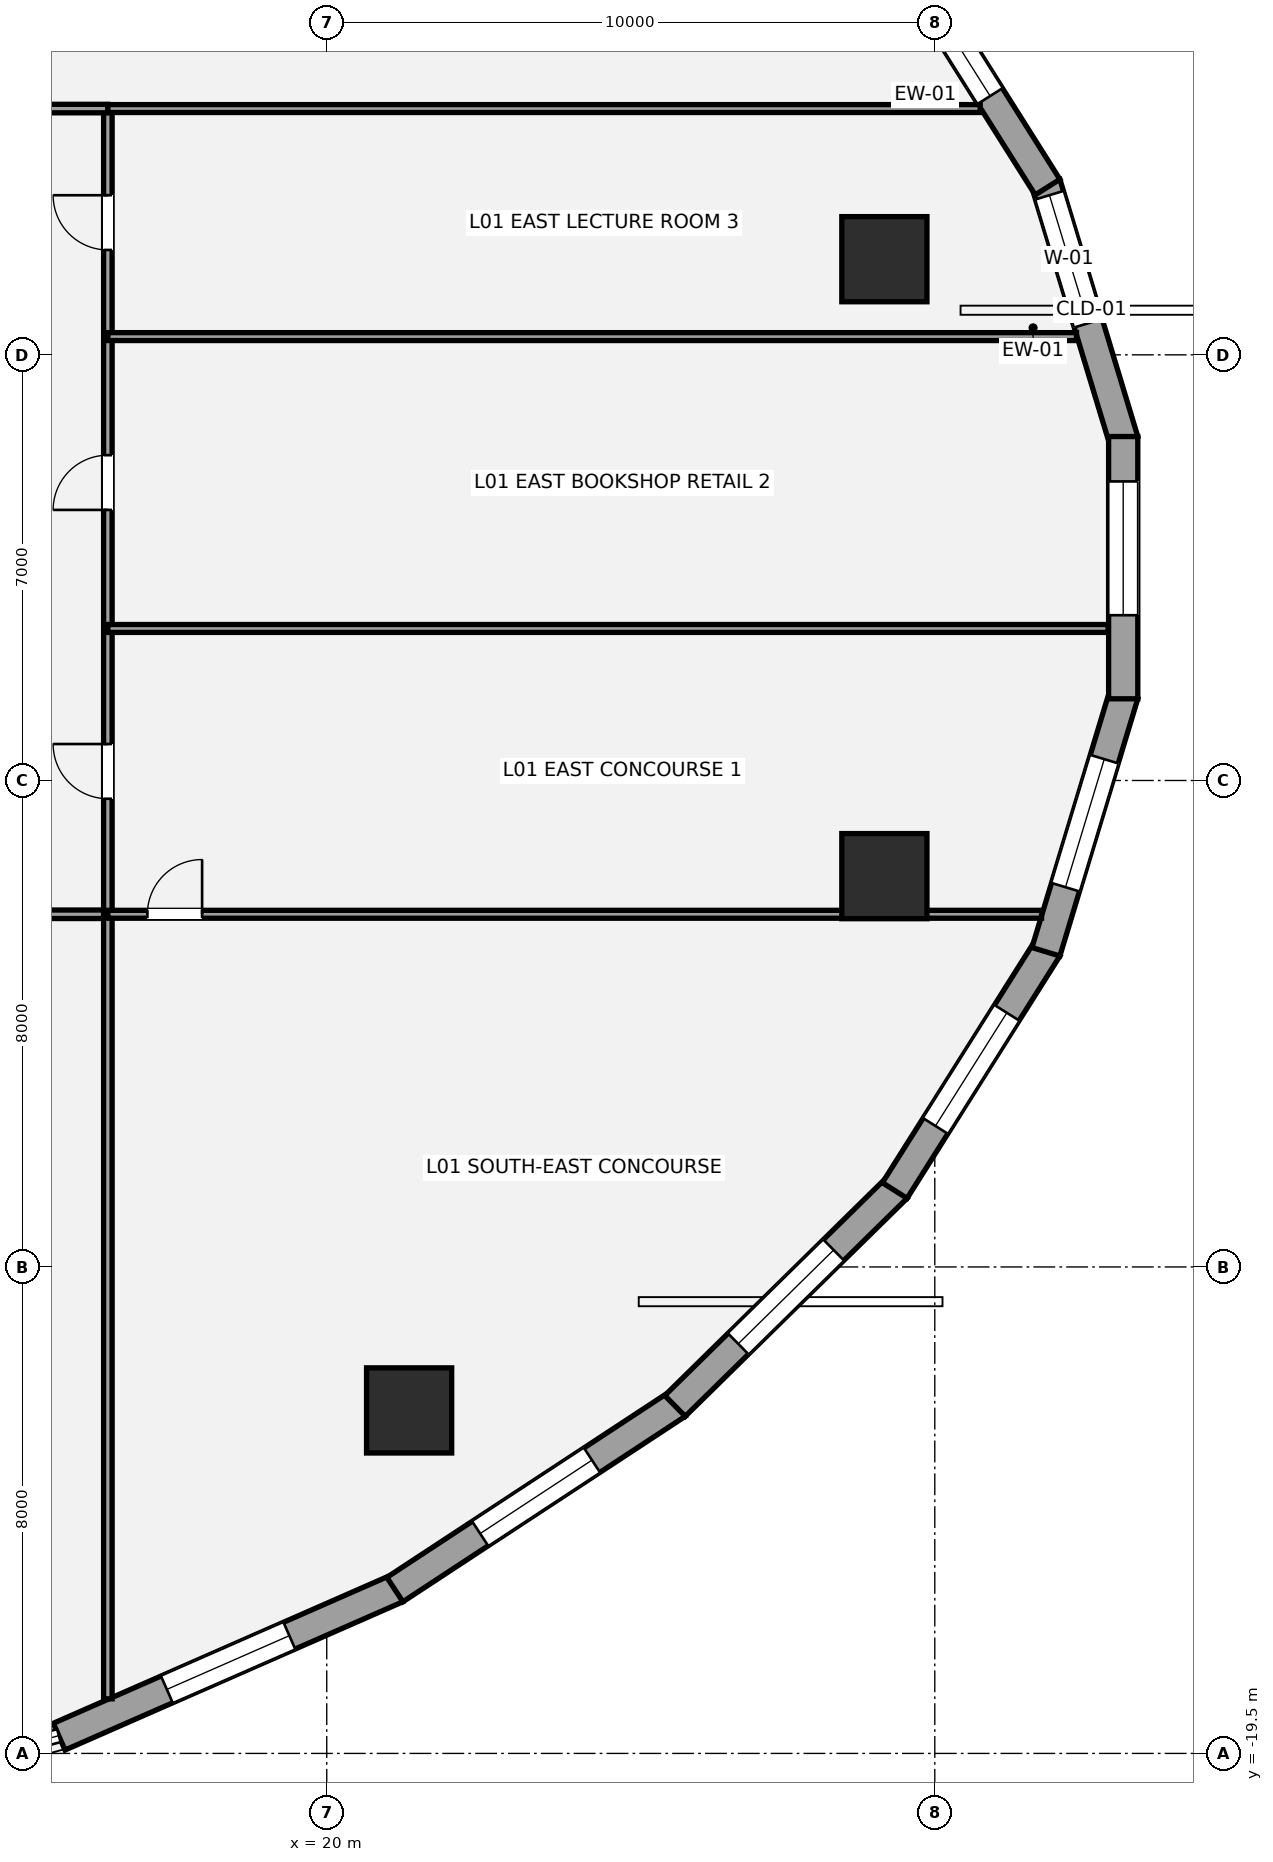
"""IFC4 building model, lengths in metres.
Left out: names, types, materials, properties, quantities, classifications, styles, units other than length and angle.
Written with IfcOpenShell. Run it as: python <this file> out.ifc"""

import sys

from ifc_helpers import new_model, si_unit, direction, frame, frame_2d, origin, origin_2d, place, context, subcontext, project, spatial, rectangle, hollow_circle, extrude, element, fill, save


model = new_model("IFC4")
c1 = context("Model", 3, precision=1e-05, world=origin(), true_north=direction((0.0, 1.0)))
c2 = subcontext(c1, "Body", "Model", "MODEL_VIEW")
j1 = project(units=[si_unit("LENGTHUNIT", "METRE"), si_unit("PLANEANGLEUNIT", "RADIAN")], contexts=[c1])
p1 = place(None, origin())
s1 = spatial("IfcSite", under=j1, at=p1, CompositionType="ELEMENT")
p2 = place(p1, origin())
s2 = spatial("IfcBuilding", under=s1, at=p2, CompositionType="ELEMENT")
p3 = place(p2, frame((0.0, 0.0, 6.0)))
s3 = spatial("IfcBuildingStorey", under=s2, at=p3, CompositionType="ELEMENT", Elevation=6.0)
for number, where, z_axis, x_axis in (
    (1, (29.171, 5.073, 0.0), (0.0, 0.0, 1.0), (1.0, 0.0, 0.0)),
    (2, (21.354, -13.859, 0.0), (0.0, 0.0, 1.0), (1.0, 0.0, 0.0)),
    (3, (29.171, -5.073, 0.0), (0.0, 0.0, 1.0), (1.0, 0.0, 0.0)),
):
    element("IfcColumn", number, at=place(p3, frame(where, z_axis=z_axis, x_axis=x_axis)), inside=s3, PredefinedType="USERDEFINED", context=c2, shape_type="SweptSolid", body=[
        extrude(hollow_circle(Radius=0.7, WallThickness=0.05, at=origin_2d()), origin(), (0.0, 0.0, 1.0), 4.2),
    ])
p4 = place(p3, frame((31.828, 6.317, 0.0), z_axis=(0.0, 0.0, 1.0), x_axis=(0.289855603468, -0.957070388811, 0.0)))
e4 = element("IfcWall", 4, at=p4, inside=s3, PredefinedType="STANDARD", context=c2, shape_type="SweptSolid", body=[
    extrude(rectangle(XDim=4.419, YDim=0.48, at=frame_2d((2.21, 0.0))), origin(), (0.0, 0.0, 1.0), 3.109),
])
p5 = place(p4, frame((0.2, 0.0, 0.7)))
e5 = element("IfcOpeningElement", 5, at=p5, cuts=e4, PredefinedType="OPENING", context=c2, shape_type="SweptSolid", body=[
    extrude(rectangle(XDim=2.2, YDim=1.95, at=frame_2d((1.1, 0.975))), frame((0.0, 0.25, 0.0), z_axis=(0.0, -1.0, 0.0), x_axis=(1.0, 0.0, 0.0)), (0.0, 0.0, 1.0), 0.5),
])
p6 = place(p3, frame((29.341, 10.243, 0.0), z_axis=(0.0, 0.0, 1.0), x_axis=(0.53349762721, -0.845801561693, 0.0)))
e6 = element("IfcWall", 6, at=p6, inside=s3, PredefinedType="STANDARD", context=c2, shape_type="SweptSolid", body=[
    extrude(rectangle(XDim=4.711, YDim=0.48, at=frame_2d((2.355, 0.0))), origin(), (0.0, 0.0, 1.0), 3.109),
])
p7 = place(p6, frame((0.74, 0.0, 0.7)))
e7 = element("IfcOpeningElement", 7, at=p7, cuts=e6, PredefinedType="OPENING", context=c2, shape_type="SweptSolid", body=[
    extrude(rectangle(XDim=2.2, YDim=1.95, at=frame_2d((1.1, 0.975))), frame((0.0, 0.25, 0.0), z_axis=(0.0, -1.0, 0.0), x_axis=(1.0, 0.0, 0.0)), (0.0, 0.0, 1.0), 0.5),
])
p8 = place(p3, frame((21.156, -16.786, 0.0), z_axis=(0.0, 0.0, 1.0), x_axis=(-0.915720949248, -0.401814811957, 0.0)))
e8 = element("IfcWall", 8, at=p8, inside=s3, PredefinedType="STANDARD", context=c2, shape_type="SweptSolid", body=[
    extrude(rectangle(XDim=6.068, YDim=0.48, at=frame_2d((3.034, 0.0))), origin(), (0.0, 0.0, 1.0), 3.109),
])
p9 = place(p8, frame((1.934, 0.0, 0.7)))
e9 = element("IfcOpeningElement", 9, at=p9, cuts=e8, PredefinedType="OPENING", context=c2, shape_type="SweptSolid", body=[
    extrude(rectangle(XDim=2.2, YDim=1.95, at=frame_2d((1.1, 0.975))), frame((0.0, 0.25, 0.0), z_axis=(0.0, -1.0, 0.0), x_axis=(1.0, 0.0, 0.0)), (0.0, 0.0, 1.0), 0.5),
])
p10 = place(p3, frame((25.764, -13.756, 0.0), z_axis=(0.0, 0.0, 1.0), x_axis=(-0.835863918172, -0.548936708827, 0.0)))
e10 = element("IfcWall", 10, at=p10, inside=s3, PredefinedType="STANDARD", context=c2, shape_type="SweptSolid", body=[
    extrude(rectangle(XDim=5.555, YDim=0.48, at=frame_2d((2.778, 0.0))), origin(), (0.0, 0.0, 1.0), 3.109),
])
p11 = place(p10, frame((1.678, 0.0, 0.7)))
e11 = element("IfcOpeningElement", 11, at=p11, cuts=e10, PredefinedType="OPENING", context=c2, shape_type="SweptSolid", body=[
    extrude(rectangle(XDim=2.2, YDim=1.95, at=frame_2d((1.1, 0.975))), frame((0.0, 0.25, 0.0), z_axis=(0.0, -1.0, 0.0), x_axis=(1.0, 0.0, 0.0)), (0.0, 0.0, 1.0), 0.5),
])
p12 = place(p3, frame((29.376, -10.199, 0.0), z_axis=(0.0, 0.0, 1.0), x_axis=(-0.713189080178, -0.700971708355, 0.0)))
e12 = element("IfcWall", 12, at=p12, inside=s3, PredefinedType="STANDARD", context=c2, shape_type="SweptSolid", body=[
    extrude(rectangle(XDim=5.116, YDim=0.48, at=frame_2d((2.558, 0.0))), origin(), (0.0, 0.0, 1.0), 3.109),
])
p13 = place(p12, frame((1.458, 0.0, 0.7)))
e13 = element("IfcOpeningElement", 13, at=p13, cuts=e12, PredefinedType="OPENING", context=c2, shape_type="SweptSolid", body=[
    extrude(rectangle(XDim=2.2, YDim=1.95, at=frame_2d((1.1, 0.975))), frame((0.0, 0.25, 0.0), z_axis=(0.0, -1.0, 0.0), x_axis=(1.0, 0.0, 0.0)), (0.0, 0.0, 1.0), 0.5),
])
p14 = place(p3, frame((31.854, -6.258, 0.0), z_axis=(0.0, 0.0, 1.0), x_axis=(-0.53349762721, -0.845801561693, 0.0)))
e14 = element("IfcWall", 14, at=p14, inside=s3, PredefinedType="STANDARD", context=c2, shape_type="SweptSolid", body=[
    extrude(rectangle(XDim=4.711, YDim=0.48, at=frame_2d((2.355, 0.0))), origin(), (0.0, 0.0, 1.0), 3.109),
])
p15 = place(p14, frame((1.255, 0.0, 0.7)))
e15 = element("IfcOpeningElement", 15, at=p15, cuts=e14, PredefinedType="OPENING", context=c2, shape_type="SweptSolid", body=[
    extrude(rectangle(XDim=2.2, YDim=1.95, at=frame_2d((1.1, 0.975))), frame((0.0, 0.25, 0.0), z_axis=(0.0, -1.0, 0.0), x_axis=(1.0, 0.0, 0.0)), (0.0, 0.0, 1.0), 0.5),
])
p16 = place(p3, frame((33.109, -2.087, 0.0), z_axis=(0.0, 0.0, 1.0), x_axis=(-0.289855603468, -0.957070388811, 0.0)))
e16 = element("IfcWall", 16, at=p16, inside=s3, PredefinedType="STANDARD", context=c2, shape_type="SweptSolid", body=[
    extrude(rectangle(XDim=4.419, YDim=0.48, at=frame_2d((2.21, 0.0))), origin(), (0.0, 0.0, 1.0), 3.109),
])
p17 = place(p16, frame((1.11, 0.0, 0.7)))
e17 = element("IfcOpeningElement", 17, at=p17, cuts=e16, PredefinedType="OPENING", context=c2, shape_type="SweptSolid", body=[
    extrude(rectangle(XDim=2.2, YDim=1.95, at=frame_2d((1.1, 0.975))), frame((0.0, 0.25, 0.0), z_axis=(0.0, -1.0, 0.0), x_axis=(1.0, 0.0, 0.0)), (0.0, 0.0, 1.0), 0.5),
])
p18 = place(p3, frame((33.099, 2.156, 0.0), z_axis=(0.0, 0.0, 1.0), x_axis=(0.0, -1.0, 0.0)))
e18 = element("IfcWall", 18, at=p18, inside=s3, PredefinedType="STANDARD", context=c2, shape_type="SweptSolid", body=[
    extrude(rectangle(XDim=4.313, YDim=0.48, at=frame_2d((2.156, 0.0))), origin(), (0.0, 0.0, 1.0), 3.109),
])
p19 = place(p18, frame((0.738, 0.0, 0.7)))
e19 = element("IfcOpeningElement", 19, at=p19, cuts=e18, PredefinedType="OPENING", context=c2, shape_type="SweptSolid", body=[
    extrude(rectangle(XDim=2.2, YDim=1.95, at=frame_2d((1.1, 0.975))), frame((0.0, 0.25, 0.0), z_axis=(0.0, -1.0, 0.0), x_axis=(1.0, 0.0, 0.0)), (0.0, 0.0, 1.0), 0.5),
])
p20 = place(p3, frame((-16.4, -5.7, 0.0), z_axis=(0.0, 0.0, 1.0), x_axis=(1.0, 0.0, 0.0)))
e20 = element("IfcWall", 20, at=p20, inside=s3, PredefinedType="PARTITIONING", context=c2, shape_type="SweptSolid", body=[
    extrude(rectangle(XDim=32.8, YDim=0.14, at=frame_2d((16.4, 0.0))), origin(), (0.0, 0.0, 1.0), 3.98),
])
p21 = place(p20, frame((4.0, 0.0, 0.0)))
e21 = element("IfcOpeningElement", 21, at=p21, cuts=e20, PredefinedType="OPENING", context=c2, shape_type="SweptSolid", body=[
    extrude(rectangle(XDim=0.9, YDim=2.1, at=frame_2d((0.45, 1.05))), frame((0.0, 0.08, 0.0), z_axis=(0.0, -1.0, 0.0), x_axis=(1.0, 0.0, 0.0)), (0.0, 0.0, 1.0), 0.16),
])
p22 = place(p20, frame((15.95, 0.0, 0.0)))
e22 = element("IfcOpeningElement", 22, at=p22, cuts=e20, PredefinedType="OPENING", context=c2, shape_type="SweptSolid", body=[
    extrude(rectangle(XDim=0.9, YDim=2.1, at=frame_2d((0.45, 1.05))), frame((0.0, 0.08, 0.0), z_axis=(0.0, -1.0, 0.0), x_axis=(1.0, 0.0, 0.0)), (0.0, 0.0, 1.0), 0.16),
])
p23 = place(p20, frame((27.6, 0.0, 0.0)))
e23 = element("IfcOpeningElement", 23, at=p23, cuts=e20, PredefinedType="OPENING", context=c2, shape_type="SweptSolid", body=[
    extrude(rectangle(XDim=1.5, YDim=2.15, at=frame_2d((0.75, 1.075))), frame((0.0, 0.08, 0.0), z_axis=(0.0, -1.0, 0.0), x_axis=(1.0, 0.0, 0.0)), (0.0, 0.0, 1.0), 0.16),
])
p24 = place(p3, frame((16.4, -18.603, 0.0), z_axis=(0.0, 0.0, 1.0), x_axis=(0.0, 1.0, 0.0)))
e24 = element("IfcWall", 24, at=p24, inside=s3, PredefinedType="PARTITIONING", context=c2, shape_type="SweptSolid", body=[
    extrude(rectangle(XDim=26.153, YDim=0.14, at=frame_2d((13.076, 0.0))), origin(), (0.0, 0.0, 1.0), 3.348),
])
p25 = place(p24, frame((14.802, 0.0, 0.0)))
e25 = element("IfcOpeningElement", 25, at=p25, cuts=e24, PredefinedType="OPENING", context=c2, shape_type="SweptSolid", body=[
    extrude(rectangle(XDim=0.9, YDim=2.1, at=frame_2d((0.45, 1.05))), frame((0.0, 0.08, 0.0), z_axis=(0.0, -1.0, 0.0), x_axis=(1.0, 0.0, 0.0)), (0.0, 0.0, 1.0), 0.16),
])
p26 = place(p24, frame((19.552, 0.0, 0.0)))
e26 = element("IfcOpeningElement", 26, at=p26, cuts=e24, PredefinedType="OPENING", context=c2, shape_type="SweptSolid", body=[
    extrude(rectangle(XDim=0.9, YDim=2.1, at=frame_2d((0.45, 1.05))), frame((0.0, 0.08, 0.0), z_axis=(0.0, -1.0, 0.0), x_axis=(1.0, 0.0, 0.0)), (0.0, 0.0, 1.0), 0.16),
])
p27 = place(p24, frame((23.827, 0.0, 0.0)))
e27 = element("IfcOpeningElement", 27, at=p27, cuts=e24, PredefinedType="OPENING", context=c2, shape_type="SweptSolid", body=[
    extrude(rectangle(XDim=0.9, YDim=2.1, at=frame_2d((0.45, 1.05))), frame((0.0, 0.08, 0.0), z_axis=(0.0, -1.0, 0.0), x_axis=(1.0, 0.0, 0.0)), (0.0, 0.0, 1.0), 0.16),
])
p28 = place(p3, frame((14.05, 7.55, 0.0), z_axis=(0.0, 0.0, 1.0), x_axis=(1.0, 0.0, 0.0)))
e28 = element("IfcWall", 28, at=p28, inside=s3, PredefinedType="PARTITIONING", context=c2, shape_type="SweptSolid", body=[
    extrude(rectangle(XDim=2.35, YDim=0.14, at=frame_2d((1.175, 0.0))), origin(), (0.0, 0.0, 1.0), 3.433),
])
p29 = place(p28, frame((0.32, 0.0, 0.0)))
e29 = element("IfcOpeningElement", 29, at=p29, cuts=e28, PredefinedType="OPENING", context=c2, shape_type="SweptSolid", body=[
    extrude(rectangle(XDim=0.92, YDim=2.15, at=frame_2d((0.46, 1.075))), frame((0.0, 0.08, 0.0), z_axis=(0.0, -1.0, 0.0), x_axis=(1.0, 0.0, 0.0)), (0.0, 0.0, 1.0), 0.16),
])
p30 = place(p3, frame((16.4, 7.55, 0.0), z_axis=(0.0, 0.0, 1.0), x_axis=(1.0, 0.0, 0.0)))
e30 = element("IfcWall", 30, at=p30, inside=s3, PredefinedType="PARTITIONING", context=c2, shape_type="SweptSolid", body=[
    extrude(rectangle(XDim=14.347, YDim=0.13, at=frame_2d((7.173, 0.0))), origin(), (0.0, 0.0, 1.0), 2.958),
])
p31 = place(p3, frame((16.4, -5.7, 0.0), z_axis=(0.0, 0.0, 1.0), x_axis=(1.0, 0.0, 0.0)))
e31 = element("IfcWall", 31, at=p31, inside=s3, PredefinedType="PARTITIONING", context=c2, shape_type="SweptSolid", body=[
    extrude(rectangle(XDim=15.356, YDim=0.13, at=frame_2d((7.678, 0.0))), origin(), (0.0, 0.0, 1.0), 2.958),
])
p32 = place(p31, frame((0.65, 0.0, 0.0)))
e32 = element("IfcOpeningElement", 32, at=p32, cuts=e31, PredefinedType="OPENING", context=c2, shape_type="SweptSolid", body=[
    extrude(rectangle(XDim=0.9, YDim=2.1, at=frame_2d((0.45, 1.05))), frame((0.0, 0.075, 0.0), z_axis=(0.0, -1.0, 0.0), x_axis=(1.0, 0.0, 0.0)), (0.0, 0.0, 1.0), 0.15),
])
p33 = place(p3, frame((16.4, -1.0, 0.0), z_axis=(0.0, 0.0, 1.0), x_axis=(1.0, 0.0, 0.0)))
e33 = element("IfcWall", 33, at=p33, inside=s3, PredefinedType="PARTITIONING", context=c2, shape_type="SweptSolid", body=[
    extrude(rectangle(XDim=16.451, YDim=0.13, at=frame_2d((8.225, 0.0))), origin(), (0.0, 0.0, 1.0), 3.348),
])
p34 = place(p3, frame((16.4, 3.8, 0.0), z_axis=(0.0, 0.0, 1.0), x_axis=(1.0, 0.0, 0.0)))
e34 = element("IfcWall", 34, at=p34, inside=s3, PredefinedType="PARTITIONING", context=c2, shape_type="SweptSolid", body=[
    extrude(rectangle(XDim=15.931, YDim=0.13, at=frame_2d((7.966, 0.0))), origin(), (0.0, 0.0, 1.0), 3.348),
])
p35 = place(p5, origin())
e35 = element("IfcWindow", 35, at=p35, inside=s3, PartitioningType="SINGLE_PANEL", PredefinedType="WINDOW", context=c2, shape_type="SweptSolid", body=[
    extrude(rectangle(XDim=2.2, YDim=1.95, at=frame_2d((1.1, 0.975))), frame((0.0, -0.01, 0.0), z_axis=(0.0, -1.0, 0.0), x_axis=(1.0, 0.0, 0.0)), (0.0, 0.0, 1.0), 0.06),
])
fill(e5, e35)
p36 = place(p7, origin())
e36 = element("IfcWindow", 36, at=p36, inside=s3, PartitioningType="SINGLE_PANEL", PredefinedType="WINDOW", context=c2, shape_type="SweptSolid", body=[
    extrude(rectangle(XDim=2.2, YDim=1.95, at=frame_2d((1.1, 0.975))), frame((0.0, -0.01, 0.0), z_axis=(0.0, -1.0, 0.0), x_axis=(1.0, 0.0, 0.0)), (0.0, 0.0, 1.0), 0.06),
])
fill(e7, e36)
p37 = place(p9, origin())
e37 = element("IfcWindow", 37, at=p37, inside=s3, PartitioningType="SINGLE_PANEL", PredefinedType="WINDOW", context=c2, shape_type="SweptSolid", body=[
    extrude(rectangle(XDim=2.2, YDim=1.95, at=frame_2d((1.1, 0.975))), frame((0.0, -0.01, 0.0), z_axis=(0.0, -1.0, 0.0), x_axis=(1.0, 0.0, 0.0)), (0.0, 0.0, 1.0), 0.06),
])
fill(e9, e37)
p38 = place(p11, origin())
e38 = element("IfcWindow", 38, at=p38, inside=s3, PartitioningType="SINGLE_PANEL", PredefinedType="WINDOW", context=c2, shape_type="SweptSolid", body=[
    extrude(rectangle(XDim=2.2, YDim=1.95, at=frame_2d((1.1, 0.975))), frame((0.0, -0.01, 0.0), z_axis=(0.0, -1.0, 0.0), x_axis=(1.0, 0.0, 0.0)), (0.0, 0.0, 1.0), 0.06),
])
fill(e11, e38)
p39 = place(p13, origin())
e39 = element("IfcWindow", 39, at=p39, inside=s3, PartitioningType="SINGLE_PANEL", PredefinedType="WINDOW", context=c2, shape_type="SweptSolid", body=[
    extrude(rectangle(XDim=2.2, YDim=1.95, at=frame_2d((1.1, 0.975))), frame((0.0, -0.01, 0.0), z_axis=(0.0, -1.0, 0.0), x_axis=(1.0, 0.0, 0.0)), (0.0, 0.0, 1.0), 0.06),
])
fill(e13, e39)
p40 = place(p15, origin())
e40 = element("IfcWindow", 40, at=p40, inside=s3, PartitioningType="SINGLE_PANEL", PredefinedType="WINDOW", context=c2, shape_type="SweptSolid", body=[
    extrude(rectangle(XDim=2.2, YDim=1.95, at=frame_2d((1.1, 0.975))), frame((0.0, -0.01, 0.0), z_axis=(0.0, -1.0, 0.0), x_axis=(1.0, 0.0, 0.0)), (0.0, 0.0, 1.0), 0.06),
])
fill(e15, e40)
p41 = place(p17, origin())
e41 = element("IfcWindow", 41, at=p41, inside=s3, PartitioningType="SINGLE_PANEL", PredefinedType="WINDOW", context=c2, shape_type="SweptSolid", body=[
    extrude(rectangle(XDim=2.2, YDim=1.95, at=frame_2d((1.1, 0.975))), frame((0.0, -0.01, 0.0), z_axis=(0.0, -1.0, 0.0), x_axis=(1.0, 0.0, 0.0)), (0.0, 0.0, 1.0), 0.06),
])
fill(e17, e41)
p42 = place(p19, origin())
e42 = element("IfcWindow", 42, at=p42, inside=s3, PartitioningType="SINGLE_PANEL", PredefinedType="WINDOW", context=c2, shape_type="SweptSolid", body=[
    extrude(rectangle(XDim=2.2, YDim=1.95, at=frame_2d((1.1, 0.975))), frame((0.0, -0.01, 0.0), z_axis=(0.0, -1.0, 0.0), x_axis=(1.0, 0.0, 0.0)), (0.0, 0.0, 1.0), 0.06),
])
fill(e19, e42)
p43 = place(p32, origin())
e43 = element("IfcDoor", 43, at=p43, inside=s3, OperationType="SINGLE_SWING_RIGHT", PredefinedType="DOOR", context=c2, shape_type="SweptSolid", body=[
    extrude(rectangle(XDim=0.9, YDim=2.1, at=frame_2d((0.45, 1.05))), frame((0.0, 0.025, 0.0), z_axis=(0.0, -1.0, 0.0), x_axis=(1.0, 0.0, 0.0)), (0.0, 0.0, 1.0), 0.05),
])
fill(e32, e43)
p44 = place(p25, origin())
e44 = element("IfcDoor", 44, at=p44, inside=s3, OperationType="SINGLE_SWING_RIGHT", PredefinedType="DOOR", context=c2, shape_type="SweptSolid", body=[
    extrude(rectangle(XDim=0.9, YDim=2.1, at=frame_2d((0.45, 1.05))), frame((0.0, 0.025, 0.0), z_axis=(0.0, -1.0, 0.0), x_axis=(1.0, 0.0, 0.0)), (0.0, 0.0, 1.0), 0.05),
])
fill(e25, e44)
p45 = place(p26, origin())
e45 = element("IfcDoor", 45, at=p45, inside=s3, OperationType="SINGLE_SWING_LEFT", PredefinedType="DOOR", context=c2, shape_type="SweptSolid", body=[
    extrude(rectangle(XDim=0.9, YDim=2.1, at=frame_2d((0.45, 1.05))), frame((0.0, 0.025, 0.0), z_axis=(0.0, -1.0, 0.0), x_axis=(1.0, 0.0, 0.0)), (0.0, 0.0, 1.0), 0.05),
])
fill(e26, e45)
p46 = place(p27, origin())
e46 = element("IfcDoor", 46, at=p46, inside=s3, OperationType="SINGLE_SWING_RIGHT", PredefinedType="DOOR", context=c2, shape_type="SweptSolid", body=[
    extrude(rectangle(XDim=0.9, YDim=2.1, at=frame_2d((0.45, 1.05))), frame((0.0, 0.025, 0.0), z_axis=(0.0, -1.0, 0.0), x_axis=(1.0, 0.0, 0.0)), (0.0, 0.0, 1.0), 0.05),
])
fill(e27, e46)
save(model, sys.argv[1])
